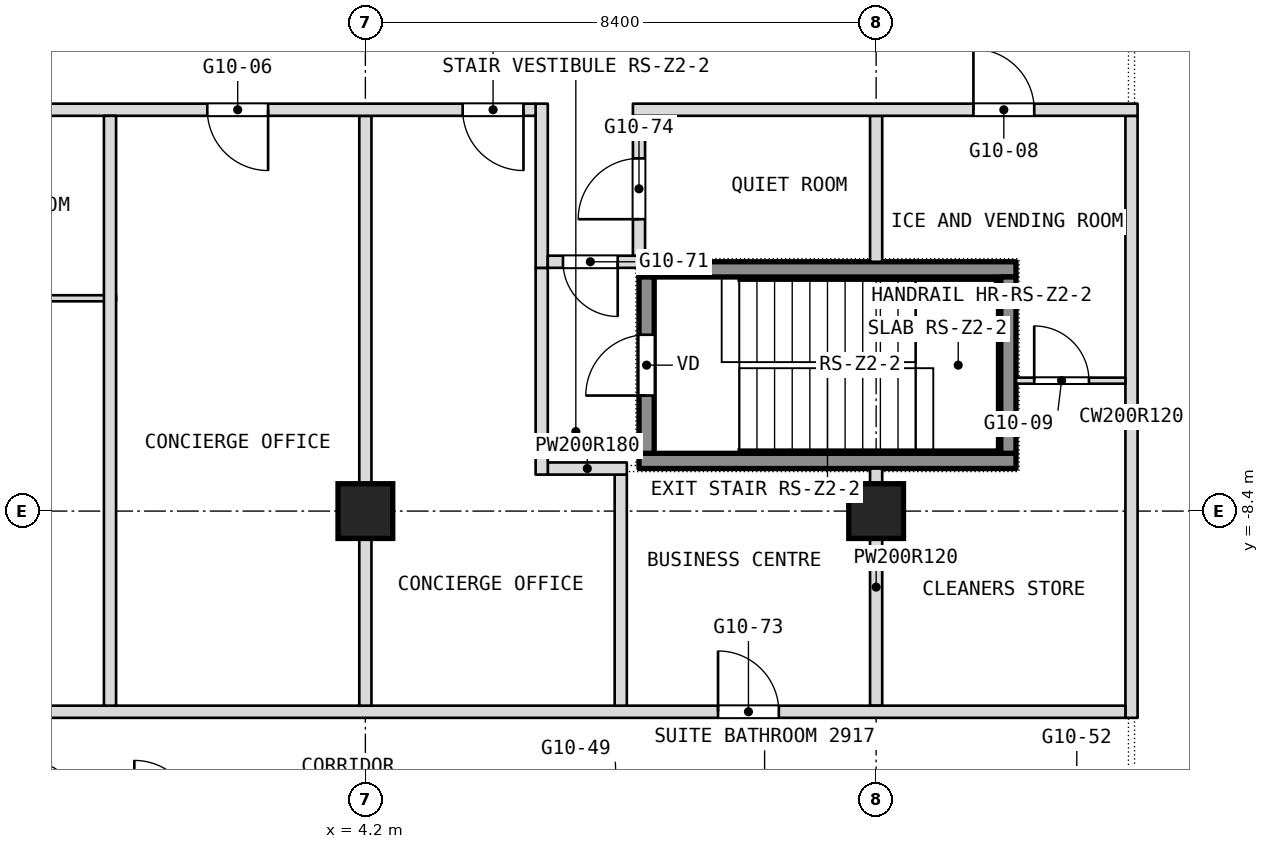
"""IFC4 building model, lengths in metres.
Left out: names, types, materials, properties, quantities, classifications, styles, units other than length and angle.
Written with IfcOpenShell. Run it as: python <this file> out.ifc"""

import sys

from ifc_helpers import new_model, si_unit, direction, frame, frame_2d, origin, origin_2d, place, context, subcontext, project, spatial, rectangle, extrude, element, fill, save


model = new_model("IFC4")
c1 = context("Model", 3, precision=1e-05, world=origin(), true_north=direction((0.0, 1.0)))
c2 = subcontext(c1, "Body", "Model", "MODEL_VIEW")
j1 = project(units=[si_unit("LENGTHUNIT", "METRE"), si_unit("PLANEANGLEUNIT", "RADIAN")], contexts=[c1])
p1 = place(None, origin())
s1 = spatial("IfcSite", under=j1, at=p1, CompositionType="ELEMENT")
p2 = place(p1, origin())
s2 = spatial("IfcBuilding", under=s1, at=p2, CompositionType="ELEMENT")
p3 = place(p2, frame((0.0, 0.0, 130.1)))
s3 = spatial("IfcBuildingStorey", under=s2, at=p3, CompositionType="ELEMENT", Elevation=130.1)
for number, where, z_axis, x_axis in (
    (1, (4.2, -8.4, 0.0), (0.0, 0.0, 1.0), (1.0, 0.0, 0.0)),
    (2, (12.6, -8.4, 0.0), (0.0, 0.0, 1.0), (1.0, 0.0, 0.0)),
):
    element("IfcColumn", number, at=place(p3, frame(where, z_axis=z_axis, x_axis=x_axis)), inside=s3, PredefinedType="COLUMN", context=c2, shape_type="SweptSolid", body=[
        extrude(rectangle(XDim=0.9, YDim=0.9, at=origin_2d()), origin(), (0.0, 0.0, 1.0), 3.6),
    ])
p4 = place(p3, frame((16.8, -11.8, 0.0), z_axis=(0.0, 0.0, 1.0), x_axis=(0.0, 1.0, 0.0)))
e3 = element("IfcWall", 3, at=p4, inside=s3, PredefinedType="PARTITIONING", context=c2, shape_type="SweptSolid", body=[
    extrude(rectangle(XDim=9.9, YDim=0.2, at=frame_2d((4.95, 0.0))), origin(), (0.0, 0.0, 1.0), 3.34),
])
p5 = place(p3, frame((12.6, -11.6, 0.0), z_axis=(0.0, 0.0, 1.0), x_axis=(0.0, 1.0, 0.0)))
e4 = element("IfcWall", 4, at=p5, inside=s3, PredefinedType="PARTITIONING", context=c2, shape_type="SweptSolid", body=[
    extrude(rectangle(XDim=3.9, YDim=0.2, at=frame_2d((1.95, 0.0))), origin(), (0.0, 0.0, 1.0), 3.34),
])
p6 = place(p3, frame((12.6, -4.3, 0.0), z_axis=(0.0, 0.0, 1.0), x_axis=(0.0, 1.0, 0.0)))
e5 = element("IfcWall", 5, at=p6, inside=s3, PredefinedType="PARTITIONING", context=c2, shape_type="SweptSolid", body=[
    extrude(rectangle(XDim=2.4, YDim=0.2, at=frame_2d((1.2, 0.0))), origin(), (0.0, 0.0, 1.0), 3.34),
])
p7 = place(p3, frame((-4.1, -11.7, 0.0), z_axis=(0.0, 0.0, 1.0), x_axis=(1.0, 0.0, 0.0)))
e6 = element("IfcWall", 6, at=p7, inside=s3, PredefinedType="PARTITIONING", context=c2, shape_type="SweptSolid", body=[
    extrude(rectangle(XDim=20.8, YDim=0.2, at=frame_2d((10.4, 0.0))), origin(), (0.0, 0.0, 1.0), 3.34),
])
p8 = place(p7, frame((14.1, 0.0, 0.0)))
e7 = element("IfcOpeningElement", 7, at=p8, cuts=e6, PredefinedType="OPENING", context=c2, shape_type="SweptSolid", body=[
    extrude(rectangle(XDim=1.0, YDim=2.1, at=frame_2d((0.5, 1.05))), frame((0.0, 0.1, 0.0), z_axis=(0.0, -1.0, 0.0), x_axis=(1.0, 0.0, 0.0)), (0.0, 0.0, 1.0), 0.2),
])
p9 = place(p3, frame((8.7, -4.3, 0.0), z_axis=(0.0, 0.0, 1.0), x_axis=(0.0, 1.0, 0.0)))
e8 = element("IfcWall", 8, at=p9, inside=s3, PredefinedType="PARTITIONING", context=c2, shape_type="SweptSolid", body=[
    extrude(rectangle(XDim=2.4, YDim=0.2, at=frame_2d((1.2, 0.0))), origin(), (0.0, 0.0, 1.0), 3.34),
])
p10 = place(p9, frame((0.7, 0.0, 0.0)))
e9 = element("IfcOpeningElement", 9, at=p10, cuts=e8, PredefinedType="OPENING", context=c2, shape_type="SweptSolid", body=[
    extrude(rectangle(XDim=1.0, YDim=2.1, at=frame_2d((0.5, 1.05))), frame((0.0, 0.1, 0.0), z_axis=(0.0, -1.0, 0.0), x_axis=(1.0, 0.0, 0.0)), (0.0, 0.0, 1.0), 0.2),
])
p11 = place(p3, frame((8.4, -11.6, 0.0), z_axis=(0.0, 0.0, 1.0), x_axis=(0.0, 1.0, 0.0)))
e10 = element("IfcWall", 10, at=p11, inside=s3, PredefinedType="PARTITIONING", context=c2, shape_type="SweptSolid", body=[
    extrude(rectangle(XDim=3.8, YDim=0.2, at=frame_2d((1.9, 0.0))), origin(), (0.0, 0.0, 1.0), 3.34),
])
p12 = place(p3, frame((7.2, -7.7, 0.0), z_axis=(0.0, 0.0, 1.0), x_axis=(1.0, 0.0, 0.0)))
e11 = element("IfcWall", 11, at=p12, inside=s3, PredefinedType="PARTITIONING", context=c2, shape_type="SweptSolid", body=[
    extrude(rectangle(XDim=1.3, YDim=0.2, at=frame_2d((0.65, 0.0))), origin(), (0.0, 0.0, 1.0), 3.34),
])
p13 = place(p3, frame((7.1, -7.8, 0.0), z_axis=(0.0, 0.0, 1.0), x_axis=(0.0, 1.0, 0.0)))
e12 = element("IfcWall", 12, at=p13, inside=s3, PredefinedType="PARTITIONING", context=c2, shape_type="SweptSolid", body=[
    extrude(rectangle(XDim=3.4, YDim=0.2, at=frame_2d((1.7, 0.0))), origin(), (0.0, 0.0, 1.0), 3.34),
])
p14 = place(p3, frame((7.1, -4.4, 0.0), z_axis=(0.0, 0.0, 1.0), x_axis=(0.0, 1.0, 0.0)))
e13 = element("IfcWall", 13, at=p14, inside=s3, PredefinedType="PARTITIONING", context=c2, shape_type="SweptSolid", body=[
    extrude(rectangle(XDim=2.7, YDim=0.2, at=frame_2d((1.35, 0.0))), origin(), (0.0, 0.0, 1.0), 3.34),
])
p15 = place(p3, frame((14.9, -6.255, 0.0), z_axis=(0.0, 0.0, 1.0), x_axis=(1.0, 0.0, 0.0)))
e14 = element("IfcWall", 14, at=p15, inside=s3, PredefinedType="PARTITIONING", context=c2, shape_type="SweptSolid", body=[
    extrude(rectangle(XDim=1.8, YDim=0.1, at=frame_2d((0.9, 0.0))), origin(), (0.0, 0.0, 1.0), 3.34),
])
p16 = place(p15, frame((0.3, 0.0, 0.0)))
e15 = element("IfcOpeningElement", 15, at=p16, cuts=e14, PredefinedType="OPENING", context=c2, shape_type="SweptSolid", body=[
    extrude(rectangle(XDim=0.9, YDim=2.1, at=frame_2d((0.45, 1.05))), frame((0.0, 0.05, 0.0), z_axis=(0.0, -1.0, 0.0), x_axis=(1.0, 0.0, 0.0)), (0.0, 0.0, 1.0), 0.1),
])
p17 = place(p3, frame((-4.1, -4.9, 0.0), z_axis=(0.0, 0.0, 1.0), x_axis=(1.0, 0.0, 0.0)))
e16 = element("IfcWall", 16, at=p17, inside=s3, PredefinedType="PARTITIONING", context=c2, shape_type="SweptSolid", body=[
    extrude(rectangle(XDim=4.2, YDim=0.1, at=frame_2d((2.1, 0.0))), origin(), (0.0, 0.0, 1.0), 3.34),
])
p18 = place(p17, frame((1.55, 0.0, 0.0)))
e17 = element("IfcOpeningElement", 17, at=p18, cuts=e16, PredefinedType="OPENING", context=c2, shape_type="SweptSolid", body=[
    extrude(rectangle(XDim=0.9, YDim=2.1, at=frame_2d((0.45, 1.05))), frame((0.0, 0.05, 0.0), z_axis=(0.0, -1.0, 0.0), x_axis=(1.0, 0.0, 0.0)), (0.0, 0.0, 1.0), 0.1),
])
p19 = place(p3, frame((7.2, -4.3, 0.0), z_axis=(0.0, 0.0, 1.0), x_axis=(1.0, 0.0, 0.0)))
e18 = element("IfcWall", 18, at=p19, inside=s3, PredefinedType="PARTITIONING", context=c2, shape_type="SweptSolid", body=[
    extrude(rectangle(XDim=1.5, YDim=0.2, at=frame_2d((0.75, 0.0))), origin(), (0.0, 0.0, 1.0), 3.34),
])
p20 = place(p19, frame((0.25, 0.0, 0.0)))
e19 = element("IfcOpeningElement", 19, at=p20, cuts=e18, PredefinedType="OPENING", context=c2, shape_type="SweptSolid", body=[
    extrude(rectangle(XDim=0.9, YDim=2.1, at=frame_2d((0.45, 1.05))), frame((0.0, 0.1, 0.0), z_axis=(0.0, -1.0, 0.0), x_axis=(1.0, 0.0, 0.0)), (0.0, 0.0, 1.0), 0.2),
])
p21 = place(p3, frame((4.2, -11.6, 0.0), z_axis=(0.0, 0.0, 1.0), x_axis=(0.0, 1.0, 0.0)))
e20 = element("IfcWall", 20, at=p21, inside=s3, PredefinedType="PARTITIONING", context=c2, shape_type="SweptSolid", body=[
    extrude(rectangle(XDim=9.7, YDim=0.2, at=frame_2d((4.85, 0.0))), origin(), (0.0, 0.0, 1.0), 3.34),
])
p22 = place(p3, frame((-4.3, -1.8, 0.0), z_axis=(0.0, 0.0, 1.0), x_axis=(1.0, 0.0, 0.0)))
e21 = element("IfcWall", 21, at=p22, inside=s3, PredefinedType="PARTITIONING", context=c2, shape_type="SweptSolid", body=[
    extrude(rectangle(XDim=11.3, YDim=0.2, at=frame_2d((5.65, 0.0))), origin(), (0.0, 0.0, 1.0), 3.34),
])
p23 = place(p22, frame((1.7, 0.0, 0.0)))
e22 = element("IfcOpeningElement", 22, at=p23, cuts=e21, PredefinedType="OPENING", context=c2, shape_type="SweptSolid", body=[
    extrude(rectangle(XDim=1.0, YDim=2.1, at=frame_2d((0.5, 1.05))), frame((0.0, 0.1, 0.0), z_axis=(0.0, -1.0, 0.0), x_axis=(1.0, 0.0, 0.0)), (0.0, 0.0, 1.0), 0.2),
])
p24 = place(p22, frame((5.9, 0.0, 0.0)))
e23 = element("IfcOpeningElement", 23, at=p24, cuts=e21, PredefinedType="OPENING", context=c2, shape_type="SweptSolid", body=[
    extrude(rectangle(XDim=1.0, YDim=2.1, at=frame_2d((0.5, 1.05))), frame((0.0, 0.1, 0.0), z_axis=(0.0, -1.0, 0.0), x_axis=(1.0, 0.0, 0.0)), (0.0, 0.0, 1.0), 0.2),
])
p25 = place(p22, frame((10.1, 0.0, 0.0)))
e24 = element("IfcOpeningElement", 24, at=p25, cuts=e21, PredefinedType="OPENING", context=c2, shape_type="SweptSolid", body=[
    extrude(rectangle(XDim=1.0, YDim=2.1, at=frame_2d((0.5, 1.05))), frame((0.0, 0.1, 0.0), z_axis=(0.0, -1.0, 0.0), x_axis=(1.0, 0.0, 0.0)), (0.0, 0.0, 1.0), 0.2),
])
p26 = place(p3, frame((8.6, -1.8, 0.0), z_axis=(0.0, 0.0, 1.0), x_axis=(1.0, 0.0, 0.0)))
e25 = element("IfcWall", 25, at=p26, inside=s3, PredefinedType="PARTITIONING", context=c2, shape_type="SweptSolid", body=[
    extrude(rectangle(XDim=8.3, YDim=0.2, at=frame_2d((4.15, 0.0))), origin(), (0.0, 0.0, 1.0), 3.34),
])
p27 = place(p26, frame((5.6, 0.0, 0.0)))
e26 = element("IfcOpeningElement", 26, at=p27, cuts=e25, PredefinedType="OPENING", context=c2, shape_type="SweptSolid", body=[
    extrude(rectangle(XDim=1.0, YDim=2.1, at=frame_2d((0.5, 1.05))), frame((0.0, 0.1, 0.0), z_axis=(0.0, -1.0, 0.0), x_axis=(1.0, 0.0, 0.0)), (0.0, 0.0, 1.0), 0.2),
])
p28 = place(p3, frame((0.0, -11.6, 0.0), z_axis=(0.0, 0.0, 1.0), x_axis=(0.0, 1.0, 0.0)))
e27 = element("IfcWall", 27, at=p28, inside=s3, PredefinedType="PARTITIONING", context=c2, shape_type="SweptSolid", body=[
    extrude(rectangle(XDim=9.7, YDim=0.2, at=frame_2d((4.85, 0.0))), origin(), (0.0, 0.0, 1.0), 3.34),
])
for number, where, z_axis, x_axis in (
    (28, (8.7, -7.575, 0.1), (0.0, 0.0, 1.0), (1.0, 0.0, 0.0)),
    (29, (8.7, -4.425, 0.1), (0.0, 0.0, 1.0), (1.0, 0.0, 0.0)),
):
    element("IfcWall", number, at=place(p3, frame(where, z_axis=z_axis, x_axis=x_axis)), inside=s3, PredefinedType="SHEAR", context=c2, shape_type="SweptSolid", body=[
        extrude(rectangle(XDim=6.2, YDim=0.25, at=frame_2d((3.1, 0.0))), origin(), (0.0, 0.0, 1.0), 3.6),
    ])
p29 = place(p3, frame((8.825, -7.45, 0.1), z_axis=(0.0, 0.0, 1.0), x_axis=(0.0, 1.0, 0.0)))
e30 = element("IfcWall", 30, at=p29, inside=s3, PredefinedType="SHEAR", context=c2, shape_type="SweptSolid", body=[
    extrude(rectangle(XDim=2.9, YDim=0.25, at=frame_2d((1.45, 0.0))), origin(), (0.0, 0.0, 1.0), 3.6),
])
p30 = place(p29, frame((0.95, 0.0, 0.0)))
e31 = element("IfcOpeningElement", 31, at=p30, cuts=e30, PredefinedType="OPENING", context=c2, shape_type="SweptSolid", body=[
    extrude(rectangle(XDim=1.0, YDim=2.1, at=frame_2d((0.5, 1.05))), frame((0.0, 0.125, 0.0), z_axis=(0.0, -1.0, 0.0), x_axis=(1.0, 0.0, 0.0)), (0.0, 0.0, 1.0), 0.25),
])
p31 = place(p3, frame((14.775, -7.45, 0.1), z_axis=(0.0, 0.0, 1.0), x_axis=(0.0, 1.0, 0.0)))
e32 = element("IfcWall", 32, at=p31, inside=s3, PredefinedType="SHEAR", context=c2, shape_type="SweptSolid", body=[
    extrude(rectangle(XDim=2.9, YDim=0.25, at=frame_2d((1.45, 0.0))), origin(), (0.0, 0.0, 1.0), 3.6),
])
p32 = place(p8, origin())
e33 = element("IfcDoor", 33, at=p32, inside=s3, OperationType="SINGLE_SWING_LEFT", PredefinedType="DOOR", context=c2, shape_type="SweptSolid", body=[
    extrude(rectangle(XDim=1.0, YDim=2.1, at=frame_2d((0.5, 1.05))), frame((0.0, 0.025, 0.0), z_axis=(0.0, -1.0, 0.0), x_axis=(1.0, 0.0, 0.0)), (0.0, 0.0, 1.0), 0.05),
])
fill(e7, e33)
p33 = place(p10, origin())
e34 = element("IfcDoor", 34, at=p33, inside=s3, OperationType="SINGLE_SWING_LEFT", PredefinedType="DOOR", context=c2, shape_type="SweptSolid", body=[
    extrude(rectangle(XDim=1.0, YDim=2.1, at=frame_2d((0.5, 1.05))), frame((0.0, 0.025, 0.0), z_axis=(0.0, -1.0, 0.0), x_axis=(1.0, 0.0, 0.0)), (0.0, 0.0, 1.0), 0.05),
])
fill(e9, e34)
p34 = place(p16, origin())
e35 = element("IfcDoor", 35, at=p34, inside=s3, OperationType="SINGLE_SWING_LEFT", PredefinedType="DOOR", context=c2, shape_type="SweptSolid", body=[
    extrude(rectangle(XDim=0.9, YDim=2.1, at=frame_2d((0.45, 1.05))), frame((0.0, 0.025, 0.0), z_axis=(0.0, -1.0, 0.0), x_axis=(1.0, 0.0, 0.0)), (0.0, 0.0, 1.0), 0.05),
])
fill(e15, e35)
p35 = place(p20, origin())
e36 = element("IfcDoor", 36, at=p35, inside=s3, OperationType="SINGLE_SWING_LEFT", PredefinedType="DOOR", context=c2, shape_type="SweptSolid", body=[
    extrude(rectangle(XDim=0.9, YDim=2.1, at=frame_2d((0.45, 1.05))), frame((0.0, 0.025, 0.0), z_axis=(0.0, -1.0, 0.0), x_axis=(1.0, 0.0, 0.0)), (0.0, 0.0, 1.0), 0.05),
])
fill(e19, e36)
p36 = place(p24, origin())
e37 = element("IfcDoor", 37, at=p36, inside=s3, OperationType="SINGLE_SWING_RIGHT", PredefinedType="DOOR", context=c2, shape_type="SweptSolid", body=[
    extrude(rectangle(XDim=1.0, YDim=2.1, at=frame_2d((0.5, 1.05))), frame((0.0, 0.025, 0.0), z_axis=(0.0, -1.0, 0.0), x_axis=(1.0, 0.0, 0.0)), (0.0, 0.0, 1.0), 0.05),
])
fill(e23, e37)
p37 = place(p25, origin())
e38 = element("IfcDoor", 38, at=p37, inside=s3, OperationType="SINGLE_SWING_LEFT", PredefinedType="DOOR", context=c2, shape_type="SweptSolid", body=[
    extrude(rectangle(XDim=1.0, YDim=2.1, at=frame_2d((0.5, 1.05))), frame((0.0, 0.025, 0.0), z_axis=(0.0, -1.0, 0.0), x_axis=(1.0, 0.0, 0.0)), (0.0, 0.0, 1.0), 0.05),
])
fill(e24, e38)
p38 = place(p27, origin())
e39 = element("IfcDoor", 39, at=p38, inside=s3, OperationType="SINGLE_SWING_RIGHT", PredefinedType="DOOR", context=c2, shape_type="SweptSolid", body=[
    extrude(rectangle(XDim=1.0, YDim=2.1, at=frame_2d((0.5, 1.05))), frame((0.0, 0.025, 0.0), z_axis=(0.0, -1.0, 0.0), x_axis=(1.0, 0.0, 0.0)), (0.0, 0.0, 1.0), 0.05),
])
fill(e26, e39)
p39 = place(p30, origin())
e40 = element("IfcDoor", 40, at=p39, inside=s3, OperationType="SINGLE_SWING_LEFT", PredefinedType="DOOR", context=c2, shape_type="SweptSolid", body=[
    extrude(rectangle(XDim=1.0, YDim=2.1, at=frame_2d((0.5, 1.05))), frame((0.0, 0.025, 0.0), z_axis=(0.0, -1.0, 0.0), x_axis=(1.0, 0.0, 0.0)), (0.0, 0.0, 1.0), 0.05),
])
fill(e31, e40)
save(model, sys.argv[1])
